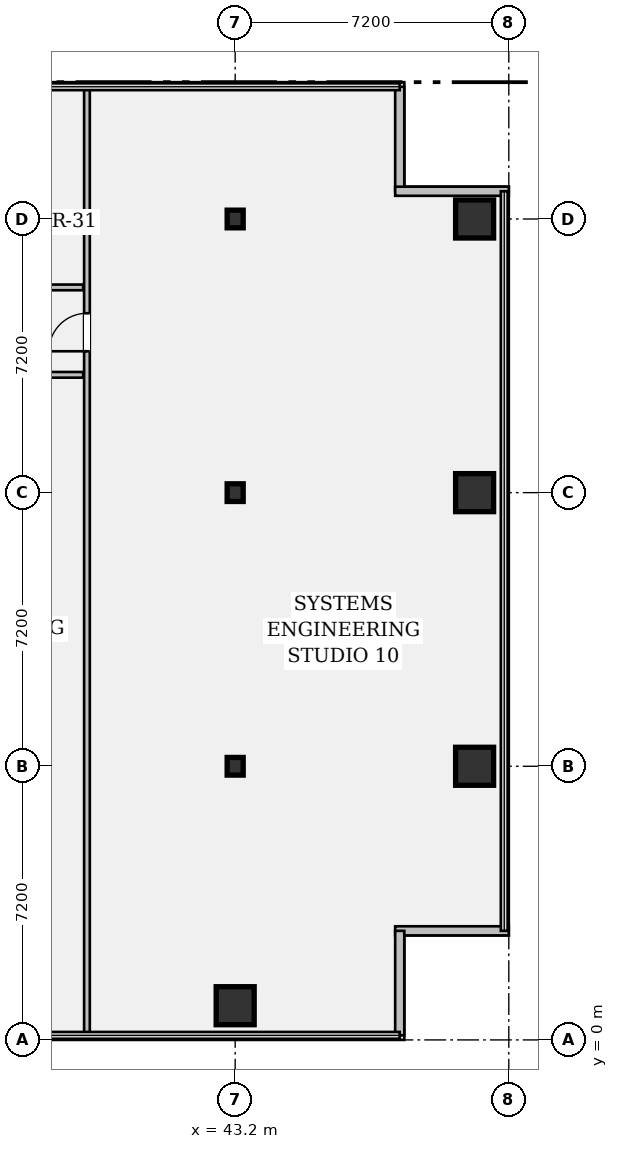
"""IFC4 building model, lengths in metres.
Left out: names, types, materials, properties, quantities, classifications, styles, units other than length and angle.
Written with IfcOpenShell. Run it as: python <this file> out.ifc"""

import sys

from ifc_helpers import new_model, si_unit, direction, frame, frame_2d, origin, origin_2d, place, context, subcontext, project, spatial, rectangle, hollow_rectangle, i_section, extrude, element, fill, save


model = new_model("IFC4")
c1 = context("Model", 3, precision=1e-05, world=origin(), true_north=direction((0.0, 1.0)))
c2 = subcontext(c1, "Body", "Model", "MODEL_VIEW")
j1 = project(units=[si_unit("LENGTHUNIT", "METRE"), si_unit("PLANEANGLEUNIT", "RADIAN")], contexts=[c1])
p1 = place(None, origin())
s1 = spatial("IfcSite", under=j1, at=p1, CompositionType="ELEMENT")
p2 = place(p1, origin())
s2 = spatial("IfcBuilding", under=s1, at=p2, CompositionType="ELEMENT")
p3 = place(p2, frame((0.0, 0.0, 69.65)))
s3 = spatial("IfcBuildingStorey", under=s2, at=p3, CompositionType="ELEMENT", Elevation=69.65)
p4 = place(p3, frame((43.2, 0.9, 0.0), z_axis=(0.0, 0.0, 1.0), x_axis=(1.0, 0.0, 0.0)))
e1 = element("IfcColumn", 1, at=p4, inside=s3, PredefinedType="COLUMN", context=c2, shape_type="SweptSolid", body=[
    extrude(hollow_rectangle(XDim=1.0, YDim=1.0, WallThickness=0.065, at=origin_2d()), origin(), (0.0, 0.0, 1.0), 3.57),
])
for number, where, z_axis, x_axis in (
    (2, (43.2, 7.2, 0.0), (0.0, 0.0, 1.0), (1.0, 0.0, 0.0)),
    (3, (43.2, 14.4, 0.0), (0.0, 0.0, 1.0), (1.0, 0.0, 0.0)),
    (4, (43.2, 21.6, 0.0), (0.0, 0.0, 1.0), (1.0, 0.0, 0.0)),
):
    element("IfcColumn", number, at=place(p3, frame(where, z_axis=z_axis, x_axis=x_axis)), inside=s3, PredefinedType="COLUMN", context=c2, shape_type="SweptSolid", body=[
        extrude(i_section(OverallWidth=0.422, OverallDepth=0.465, WebThickness=0.045, FlangeThickness=0.073, FilletRadius=0.018, at=origin_2d()), origin(), (0.0, 0.0, 1.0), 3.57),
    ])
for number, where, z_axis, x_axis in (
    (5, (49.5, 7.2, 0.0), (0.0, 0.0, 1.0), (1.0, 0.0, 0.0)),
    (6, (49.5, 14.4, 0.0), (0.0, 0.0, 1.0), (1.0, 0.0, 0.0)),
    (7, (49.5, 21.6, 0.0), (0.0, 0.0, 1.0), (1.0, 0.0, 0.0)),
):
    element("IfcColumn", number, at=place(p3, frame(where, z_axis=z_axis, x_axis=x_axis)), inside=s3, PredefinedType="COLUMN", context=c2, shape_type="SweptSolid", body=[
        extrude(hollow_rectangle(XDim=1.0, YDim=1.0, WallThickness=0.065, at=origin_2d()), origin(), (0.0, 0.0, 1.0), 3.57),
    ])
p5 = place(p3, frame((47.53, 25.08, 0.0), z_axis=(0.0, 0.0, 1.0), x_axis=(0.0, -1.0, 0.0)))
e8 = element("IfcWall", 8, at=p5, inside=s3, PredefinedType="STANDARD", context=c2, shape_type="SweptSolid", body=[
    extrude(rectangle(XDim=2.75, YDim=0.24, at=frame_2d((1.375, 0.0))), origin(), (0.0, 0.0, 1.0), 3.57),
])
for number, where, z_axis, x_axis in (
    (9, (47.41, 22.33, 0.0), (0.0, 0.0, 1.0), (1.0, 0.0, 0.0)),
    (10, (50.4, 2.87, 0.0), (0.0, 0.0, 1.0), (-1.0, 0.0, 0.0)),
):
    element("IfcWall", number, at=place(p3, frame(where, z_axis=z_axis, x_axis=x_axis)), inside=s3, PredefinedType="STANDARD", context=c2, shape_type="SweptSolid", body=[
        extrude(rectangle(XDim=2.99, YDim=0.24, at=frame_2d((1.495, 0.0))), origin(), (0.0, 0.0, 1.0), 3.57),
    ])
p6 = place(p3, frame((47.53, 2.87, 0.0), z_axis=(0.0, 0.0, 1.0), x_axis=(0.0, -1.0, 0.0)))
e11 = element("IfcWall", 11, at=p6, inside=s3, PredefinedType="STANDARD", context=c2, shape_type="SweptSolid", body=[
    extrude(rectangle(XDim=2.75, YDim=0.24, at=frame_2d((1.375, 0.0))), origin(), (0.0, 0.0, 1.0), 3.57),
])
p7 = place(p3, frame((17.35, 17.5, 0.0), z_axis=(0.0, 0.0, 1.0), x_axis=(1.0, 0.0, 0.0)))
e12 = element("IfcWall", 12, at=p7, inside=s3, PredefinedType="PARTITIONING", context=c2, shape_type="SweptSolid", body=[
    extrude(rectangle(XDim=21.85, YDim=0.15, at=frame_2d((10.925, 0.0))), origin(), (0.0, 0.0, 1.0), 2.699),
])
p8 = place(p7, frame((4.02, 0.0, 0.0)))
e13 = element("IfcOpeningElement", 13, at=p8, cuts=e12, PredefinedType="OPENING", context=c2, shape_type="SweptSolid", body=[
    extrude(rectangle(XDim=0.95, YDim=2.15, at=frame_2d((0.475, 1.075))), frame((0.0, 0.087, 0.0), z_axis=(0.0, -1.0, 0.0), x_axis=(1.0, 0.0, 0.0)), (0.0, 0.0, 1.0), 0.174),
])
p9 = place(p7, frame((12.45, 0.0, 0.0)))
e14 = element("IfcOpeningElement", 14, at=p9, cuts=e12, PredefinedType="OPENING", context=c2, shape_type="SweptSolid", body=[
    extrude(rectangle(XDim=0.95, YDim=2.15, at=frame_2d((0.475, 1.075))), frame((0.0, 0.087, 0.0), z_axis=(0.0, -1.0, 0.0), x_axis=(1.0, 0.0, 0.0)), (0.0, 0.0, 1.0), 0.174),
])
p10 = place(p7, frame((18.85, 0.0, 0.0)))
e15 = element("IfcOpeningElement", 15, at=p10, cuts=e12, PredefinedType="OPENING", context=c2, shape_type="SweptSolid", body=[
    extrude(rectangle(XDim=0.95, YDim=2.15, at=frame_2d((0.475, 1.075))), frame((0.0, 0.087, 0.0), z_axis=(0.0, -1.0, 0.0), x_axis=(1.0, 0.0, 0.0)), (0.0, 0.0, 1.0), 0.174),
])
p11 = place(p3, frame((17.35, 19.8, 0.0), z_axis=(0.0, 0.0, 1.0), x_axis=(1.0, 0.0, 0.0)))
e16 = element("IfcWall", 16, at=p11, inside=s3, PredefinedType="PARTITIONING", context=c2, shape_type="SweptSolid", body=[
    extrude(rectangle(XDim=21.85, YDim=0.15, at=frame_2d((10.925, 0.0))), origin(), (0.0, 0.0, 1.0), 2.699),
])
p12 = place(p11, frame((0.7, 0.0, 0.0)))
e17 = element("IfcOpeningElement", 17, at=p12, cuts=e16, PredefinedType="OPENING", context=c2, shape_type="SweptSolid", body=[
    extrude(rectangle(XDim=0.85, YDim=2.15, at=frame_2d((0.425, 1.075))), frame((0.0, 0.087, 0.0), z_axis=(0.0, -1.0, 0.0), x_axis=(1.0, 0.0, 0.0)), (0.0, 0.0, 1.0), 0.174),
])
p13 = place(p11, frame((3.95, 0.0, 0.0)))
e18 = element("IfcOpeningElement", 18, at=p13, cuts=e16, PredefinedType="OPENING", context=c2, shape_type="SweptSolid", body=[
    extrude(rectangle(XDim=0.85, YDim=2.15, at=frame_2d((0.425, 1.075))), frame((0.0, 0.087, 0.0), z_axis=(0.0, -1.0, 0.0), x_axis=(1.0, 0.0, 0.0)), (0.0, 0.0, 1.0), 0.174),
])
p14 = place(p11, frame((6.46, 0.0, 0.0)))
e19 = element("IfcOpeningElement", 19, at=p14, cuts=e16, PredefinedType="OPENING", context=c2, shape_type="SweptSolid", body=[
    extrude(rectangle(XDim=0.85, YDim=2.15, at=frame_2d((0.425, 1.075))), frame((0.0, 0.087, 0.0), z_axis=(0.0, -1.0, 0.0), x_axis=(1.0, 0.0, 0.0)), (0.0, 0.0, 1.0), 0.174),
])
p15 = place(p11, frame((9.5, 0.0, 0.0)))
e20 = element("IfcOpeningElement", 20, at=p15, cuts=e16, PredefinedType="OPENING", context=c2, shape_type="SweptSolid", body=[
    extrude(rectangle(XDim=0.95, YDim=2.15, at=frame_2d((0.475, 1.075))), frame((0.0, 0.087, 0.0), z_axis=(0.0, -1.0, 0.0), x_axis=(1.0, 0.0, 0.0)), (0.0, 0.0, 1.0), 0.174),
])
p16 = place(p3, frame((39.3, 0.12, 0.0), z_axis=(0.0, 0.0, 1.0), x_axis=(0.0, 1.0, 0.0)))
e21 = element("IfcWall", 21, at=p16, inside=s3, PredefinedType="PARTITIONING", context=c2, shape_type="SweptSolid", body=[
    extrude(rectangle(XDim=24.96, YDim=0.15, at=frame_2d((12.48, 0.0))), origin(), (0.0, 0.0, 1.0), 2.699),
])
p17 = place(p16, frame((18.0, 0.0, 0.0)))
e22 = element("IfcOpeningElement", 22, at=p17, cuts=e21, PredefinedType="OPENING", context=c2, shape_type="SweptSolid", body=[
    extrude(rectangle(XDim=1.0, YDim=2.15, at=frame_2d((0.5, 1.075))), frame((0.0, 0.087, 0.0), z_axis=(0.0, -1.0, 0.0), x_axis=(1.0, 0.0, 0.0)), (0.0, 0.0, 1.0), 0.174),
])
p18 = place(p17, origin())
e23 = element("IfcDoor", 23, at=p18, inside=s3, OperationType="SINGLE_SWING_LEFT", PredefinedType="DOOR", context=c2, shape_type="SweptSolid", body=[
    extrude(rectangle(XDim=1.0, YDim=2.15, at=frame_2d((0.5, 1.075))), frame((0.0, 0.025, 0.0), z_axis=(0.0, -1.0, 0.0), x_axis=(1.0, 0.0, 0.0)), (0.0, 0.0, 1.0), 0.05),
])
fill(e22, e23)
save(model, sys.argv[1])
